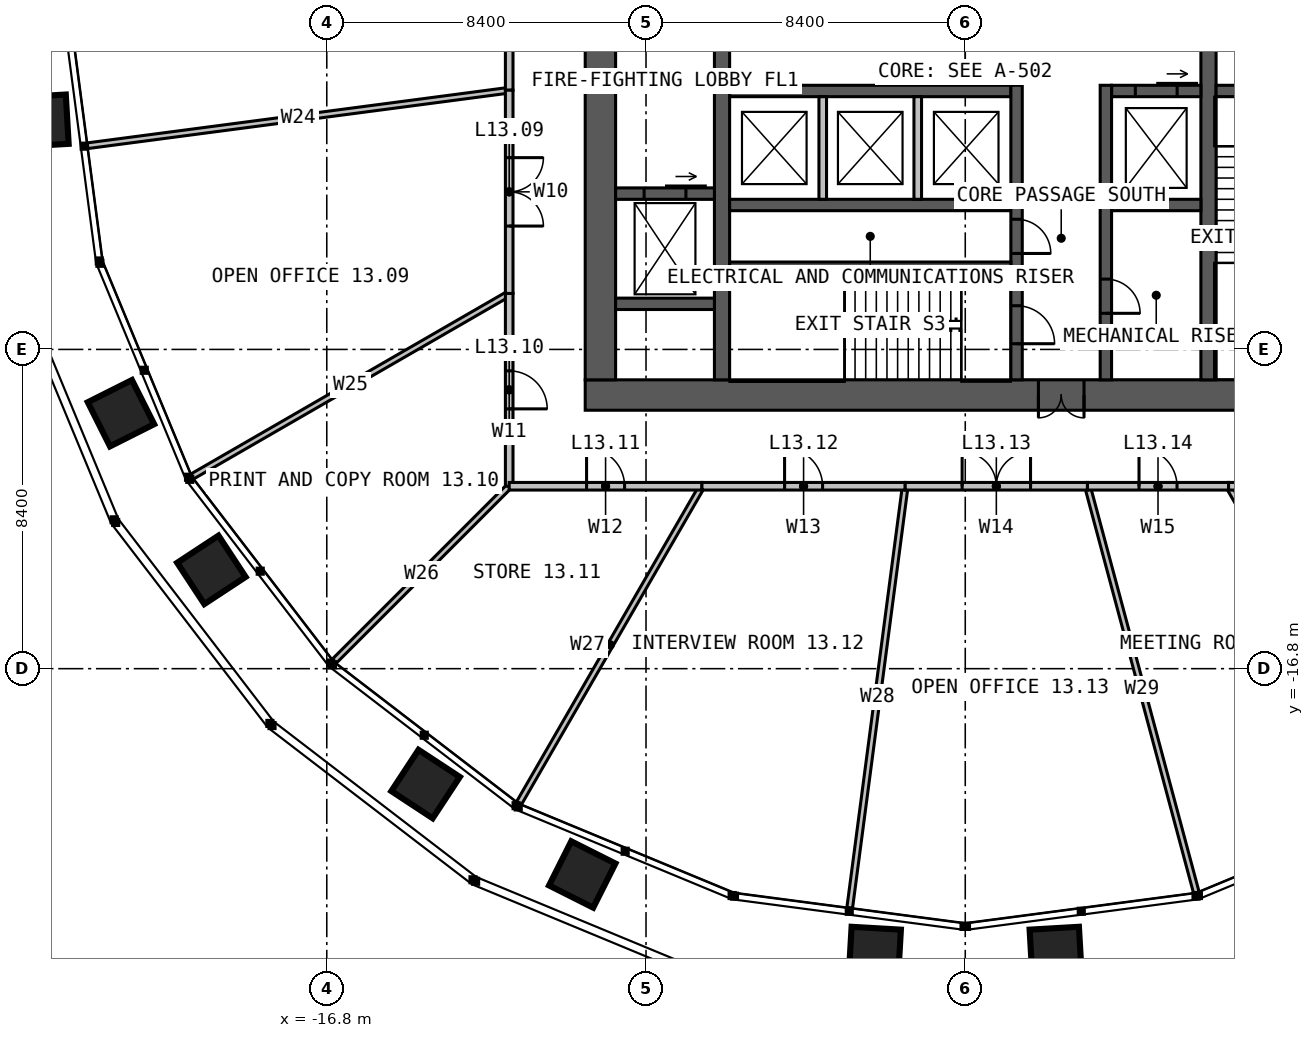
"""IFC4 building model, lengths in metres.
Left out: names, types, materials, properties, quantities, classifications, styles, units other than length and angle.
Written with IfcOpenShell. Run it as: python <this file> out.ifc"""

import sys

from ifc_helpers import new_model, si_unit, direction, frame, frame_2d, origin, place, context, subcontext, project, spatial, rectangle, extrude, element, fill, save


model = new_model("IFC4")
c1 = context("Model", 3, precision=1e-05, world=origin(), true_north=direction((0.0, 1.0)))
c2 = subcontext(c1, "Body", "Model", "MODEL_VIEW")
j1 = project(units=[si_unit("LENGTHUNIT", "METRE"), si_unit("PLANEANGLEUNIT", "RADIAN")], contexts=[c1])
p1 = place(None, origin())
s1 = spatial("IfcSite", under=j1, at=p1, CompositionType="ELEMENT")
p2 = place(p1, origin())
s2 = spatial("IfcBuilding", under=s1, at=p2, CompositionType="ELEMENT")
p3 = place(p2, frame((0.0, 0.0, 57.0)))
s3 = spatial("IfcBuildingStorey", under=s2, at=p3, CompositionType="ELEMENT", Elevation=57.0)
p4 = place(p3, frame((10.0, -9.6, 0.0), z_axis=(0.0, 0.0, 1.0), x_axis=(-1.0, 0.0, 0.0)))
e1 = element("IfcWall", 1, at=p4, inside=s3, PredefinedType="SOLIDWALL", context=c2, shape_type="SweptSolid", body=[
    extrude(rectangle(XDim=20.0, YDim=0.8, at=frame_2d((10.0, 0.0))), origin(), (0.0, 0.0, 1.0), 4.0),
])
p5 = place(p4, frame((6.875, 0.0, 0.0)))
e2 = element("IfcOpeningElement", 2, at=p5, cuts=e1, PredefinedType="OPENING", context=c2, shape_type="SweptSolid", body=[
    extrude(rectangle(XDim=1.2, YDim=2.2, at=frame_2d((0.6, 1.1))), frame((0.0, 0.41, 0.0), z_axis=(0.0, -1.0, 0.0), x_axis=(1.0, 0.0, 0.0)), (0.0, 0.0, 1.0), 0.82),
])
p6 = place(p3, frame((-9.6, 9.2, 0.0), z_axis=(0.0, 0.0, 1.0), x_axis=(0.0, -1.0, 0.0)))
e3 = element("IfcWall", 3, at=p6, inside=s3, PredefinedType="SOLIDWALL", context=c2, shape_type="SweptSolid", body=[
    extrude(rectangle(XDim=18.4, YDim=0.8, at=frame_2d((9.2, 0.0))), origin(), (0.0, 0.0, 1.0), 4.0),
])
p7 = place(p3, frame((-6.4, -9.2, 0.0), z_axis=(0.0, 0.0, 1.0), x_axis=(0.0, 1.0, 0.0)))
e4 = element("IfcWall", 4, at=p7, inside=s3, PredefinedType="SOLIDWALL", context=c2, shape_type="SweptSolid", body=[
    extrude(rectangle(XDim=18.4, YDim=0.4, at=frame_2d((9.2, 0.0))), origin(), (0.0, 0.0, 1.0), 4.0),
])
p8 = place(p7, frame((8.7, 0.0, 0.0)))
e5 = element("IfcOpeningElement", 5, at=p8, cuts=e4, PredefinedType="OPENING", context=c2, shape_type="SweptSolid", body=[
    extrude(rectangle(XDim=1.0, YDim=2.2, at=frame_2d((0.5, 1.1))), frame((0.0, 0.21, 0.0), z_axis=(0.0, -1.0, 0.0), x_axis=(1.0, 0.0, 0.0)), (0.0, 0.0, 1.0), 0.42),
])
p9 = place(p3, frame((6.4, 9.2, 0.0), z_axis=(0.0, 0.0, 1.0), x_axis=(0.0, -1.0, 0.0)))
e6 = element("IfcWall", 6, at=p9, inside=s3, PredefinedType="SOLIDWALL", context=c2, shape_type="SweptSolid", body=[
    extrude(rectangle(XDim=18.4, YDim=0.4, at=frame_2d((9.2, 0.0))), origin(), (0.0, 0.0, 1.0), 4.0),
])
p10 = place(p9, frame((8.7, 0.0, 0.0)))
e7 = element("IfcOpeningElement", 7, at=p10, cuts=e6, PredefinedType="OPENING", context=c2, shape_type="SweptSolid", body=[
    extrude(rectangle(XDim=1.0, YDim=2.2, at=frame_2d((0.5, 1.1))), frame((0.0, 0.21, 0.0), z_axis=(0.0, -1.0, 0.0), x_axis=(1.0, 0.0, 0.0)), (0.0, 0.0, 1.0), 0.42),
])
p11 = place(p3, frame((-6.2, -1.6, 0.0), z_axis=(0.0, 0.0, 1.0), x_axis=(1.0, 0.0, 0.0)))
e8 = element("IfcWall", 8, at=p11, inside=s3, PredefinedType="SOLIDWALL", context=c2, shape_type="SweptSolid", body=[
    extrude(rectangle(XDim=7.4, YDim=0.3, at=frame_2d((3.7, 0.0))), origin(), (0.0, 0.0, 1.0), 4.0),
])
p12 = place(p3, frame((3.85, -1.6, 0.0), z_axis=(0.0, 0.0, 1.0), x_axis=(1.0, 0.0, 0.0)))
e9 = element("IfcWall", 9, at=p12, inside=s3, PredefinedType="SOLIDWALL", context=c2, shape_type="SweptSolid", body=[
    extrude(rectangle(XDim=2.35, YDim=0.3, at=frame_2d((1.175, 0.0))), origin(), (0.0, 0.0, 1.0), 4.0),
])
p13 = place(p12, frame((0.625, 0.0, 0.0)))
e10 = element("IfcOpeningElement", 10, at=p13, cuts=e9, PredefinedType="OPENING", context=c2, shape_type="SweptSolid", body=[
    extrude(rectangle(XDim=1.1, YDim=2.2, at=frame_2d((0.55, 1.1))), frame((0.0, 0.16, 0.0), z_axis=(0.0, -1.0, 0.0), x_axis=(1.0, 0.0, 0.0)), (0.0, 0.0, 1.0), 0.32),
])
p14 = place(p3, frame((-6.2, -4.6, 0.0), z_axis=(0.0, 0.0, 1.0), x_axis=(1.0, 0.0, 0.0)))
e11 = element("IfcWall", 11, at=p14, inside=s3, PredefinedType="SOLIDWALL", context=c2, shape_type="SweptSolid", body=[
    extrude(rectangle(XDim=7.4, YDim=0.3, at=frame_2d((3.7, 0.0))), origin(), (0.0, 0.0, 1.0), 4.0),
])
p15 = place(p3, frame((3.85, -4.6, 0.0), z_axis=(0.0, 0.0, 1.0), x_axis=(1.0, 0.0, 0.0)))
e12 = element("IfcWall", 12, at=p15, inside=s3, PredefinedType="SOLIDWALL", context=c2, shape_type="SweptSolid", body=[
    extrude(rectangle(XDim=2.35, YDim=0.3, at=frame_2d((1.175, 0.0))), origin(), (0.0, 0.0, 1.0), 4.0),
])
p16 = place(p3, frame((1.35, -1.45, 0.0), z_axis=(0.0, 0.0, 1.0), x_axis=(0.0, -1.0, 0.0)))
e13 = element("IfcWall", 13, at=p16, inside=s3, PredefinedType="SOLIDWALL", context=c2, shape_type="SweptSolid", body=[
    extrude(rectangle(XDim=7.75, YDim=0.3, at=frame_2d((3.875, 0.0))), origin(), (0.0, 0.0, 1.0), 4.0),
])
p17 = place(p16, frame((5.8, 0.0, 0.0)))
e14 = element("IfcOpeningElement", 14, at=p17, cuts=e13, PredefinedType="OPENING", context=c2, shape_type="SweptSolid", body=[
    extrude(rectangle(XDim=1.0, YDim=2.2, at=frame_2d((0.5, 1.1))), frame((0.0, 0.16, 0.0), z_axis=(0.0, -1.0, 0.0), x_axis=(1.0, 0.0, 0.0)), (0.0, 0.0, 1.0), 0.32),
])
p18 = place(p16, frame((3.525, 0.0, 0.0)))
e15 = element("IfcOpeningElement", 15, at=p18, cuts=e13, PredefinedType="OPENING", context=c2, shape_type="SweptSolid", body=[
    extrude(rectangle(XDim=0.9, YDim=2.2, at=frame_2d((0.45, 1.1))), frame((0.0, 0.16, 0.0), z_axis=(0.0, -1.0, 0.0), x_axis=(1.0, 0.0, 0.0)), (0.0, 0.0, 1.0), 0.32),
])
p19 = place(p3, frame((3.7, -1.45, 0.0), z_axis=(0.0, 0.0, 1.0), x_axis=(0.0, -1.0, 0.0)))
e16 = element("IfcWall", 16, at=p19, inside=s3, PredefinedType="SOLIDWALL", context=c2, shape_type="SweptSolid", body=[
    extrude(rectangle(XDim=7.75, YDim=0.3, at=frame_2d((3.875, 0.0))), origin(), (0.0, 0.0, 1.0), 4.0),
])
p20 = place(p19, frame((5.1, 0.0, 0.0)))
e17 = element("IfcOpeningElement", 17, at=p20, cuts=e16, PredefinedType="OPENING", context=c2, shape_type="SweptSolid", body=[
    extrude(rectangle(XDim=0.9, YDim=2.2, at=frame_2d((0.45, 1.1))), frame((0.0, 0.16, 0.0), z_axis=(0.0, -1.0, 0.0), x_axis=(1.0, 0.0, 0.0)), (0.0, 0.0, 1.0), 0.32),
])
p21 = place(p3, frame((-6.2, -6.2, 0.0), z_axis=(0.0, 0.0, 1.0), x_axis=(1.0, 0.0, 0.0)))
e18 = element("IfcWall", 18, at=p21, inside=s3, PredefinedType="SOLIDWALL", context=c2, shape_type="SweptSolid", body=[
    extrude(rectangle(XDim=7.4, YDim=0.2, at=frame_2d((3.7, 0.0))), origin(), (0.0, 0.0, 1.0), 4.0),
])
p22 = place(p3, frame((6.6, -1.6, 0.0), z_axis=(0.0, 0.0, 1.0), x_axis=(1.0, 0.0, 0.0)))
e19 = element("IfcWall", 19, at=p22, inside=s3, PredefinedType="SOLIDWALL", context=c2, shape_type="SweptSolid", body=[
    extrude(rectangle(XDim=2.6, YDim=0.3, at=frame_2d((1.3, 0.0))), origin(), (0.0, 0.0, 1.0), 4.0),
])
p23 = place(p22, frame((0.8, 0.0, 0.0)))
e20 = element("IfcOpeningElement", 20, at=p23, cuts=e19, PredefinedType="OPENING", context=c2, shape_type="SweptSolid", body=[
    extrude(rectangle(XDim=1.0, YDim=2.2, at=frame_2d((0.5, 1.1))), frame((0.0, 0.16, 0.0), z_axis=(0.0, -1.0, 0.0), x_axis=(1.0, 0.0, 0.0)), (0.0, 0.0, 1.0), 0.32),
])
p24 = place(p3, frame((-9.2, -4.3, 0.0), z_axis=(0.0, 0.0, 1.0), x_axis=(1.0, 0.0, 0.0)))
e21 = element("IfcWall", 21, at=p24, inside=s3, PredefinedType="SOLIDWALL", context=c2, shape_type="SweptSolid", body=[
    extrude(rectangle(XDim=2.6, YDim=0.3, at=frame_2d((1.3, 0.0))), origin(), (0.0, 0.0, 1.0), 4.0),
])
p25 = place(p24, frame((0.75, 0.0, 0.0)))
e22 = element("IfcOpeningElement", 22, at=p25, cuts=e21, PredefinedType="OPENING", context=c2, shape_type="SweptSolid", body=[
    extrude(rectangle(XDim=1.1, YDim=2.2, at=frame_2d((0.55, 1.1))), frame((0.0, 0.16, 0.0), z_axis=(0.0, -1.0, 0.0), x_axis=(1.0, 0.0, 0.0)), (0.0, 0.0, 1.0), 0.32),
])
p26 = place(p3, frame((-9.2, -7.2, 0.0), z_axis=(0.0, 0.0, 1.0), x_axis=(1.0, 0.0, 0.0)))
e23 = element("IfcWall", 23, at=p26, inside=s3, PredefinedType="SOLIDWALL", context=c2, shape_type="SweptSolid", body=[
    extrude(rectangle(XDim=2.6, YDim=0.3, at=frame_2d((1.3, 0.0))), origin(), (0.0, 0.0, 1.0), 4.0),
])
for number, where, z_axis, x_axis in (
    (24, (-3.75, -1.75, 0.0), (0.0, 0.0, 1.0), (0.0, -1.0, 0.0)),
    (25, (-1.25, -1.75, 0.0), (0.0, 0.0, 1.0), (0.0, -1.0, 0.0)),
):
    element("IfcWall", number, at=place(p3, frame(where, z_axis=z_axis, x_axis=x_axis)), inside=s3, PredefinedType="SOLIDWALL", context=c2, shape_type="SweptSolid", body=[
        extrude(rectangle(XDim=2.7, YDim=0.2, at=frame_2d((1.35, 0.0))), origin(), (0.0, 0.0, 1.0), 3.75),
    ])
p27 = place(p3, frame((-12.0, -1.58, 0.0), z_axis=(0.0, 0.0, 1.0), x_axis=(-0.991446050429, -0.130517160134, 0.0)))
e26 = element("IfcWall", 26, at=p27, inside=s3, PredefinedType="PARTITIONING", context=c2, shape_type="SweptSolid", body=[
    extrude(rectangle(XDim=11.19, YDim=0.15, at=frame_2d((5.595, 0.0))), origin(), (0.0, 0.0, 1.0), 2.79),
])
p28 = place(p3, frame((-12.0, -6.928, 0.0), z_axis=(0.0, 0.0, 1.0), x_axis=(-0.866030350715, -0.499991431567, 0.0)))
e27 = element("IfcWall", 27, at=p28, inside=s3, PredefinedType="PARTITIONING", context=c2, shape_type="SweptSolid", body=[
    extrude(rectangle(XDim=9.638, YDim=0.15, at=frame_2d((4.819, 0.0))), origin(), (0.0, 0.0, 1.0), 2.79),
])
p29 = place(p3, frame((-12.0, -12.0, 0.0), z_axis=(0.0, 0.0, 1.0), x_axis=(-0.707106781187, -0.707106781187, 0.0)))
e28 = element("IfcWall", 28, at=p29, inside=s3, PredefinedType="PARTITIONING", context=c2, shape_type="SweptSolid", body=[
    extrude(rectangle(XDim=6.524, YDim=0.15, at=frame_2d((3.262, 0.0))), origin(), (0.0, 0.0, 1.0), 2.79),
])
p30 = place(p3, frame((-6.928, -12.0, 0.0), z_axis=(0.0, 0.0, 1.0), x_axis=(-0.499991431567, -0.866030350715, 0.0)))
e29 = element("IfcWall", 29, at=p30, inside=s3, PredefinedType="PARTITIONING", context=c2, shape_type="SweptSolid", body=[
    extrude(rectangle(XDim=9.638, YDim=0.15, at=frame_2d((4.819, 0.0))), origin(), (0.0, 0.0, 1.0), 2.79),
])
p31 = place(p3, frame((-1.58, -12.0, 0.0), z_axis=(0.0, 0.0, 1.0), x_axis=(-0.130517160134, -0.991446050429, 0.0)))
e30 = element("IfcWall", 30, at=p31, inside=s3, PredefinedType="PARTITIONING", context=c2, shape_type="SweptSolid", body=[
    extrude(rectangle(XDim=11.19, YDim=0.15, at=frame_2d((5.595, 0.0))), origin(), (0.0, 0.0, 1.0), 2.79),
])
p32 = place(p3, frame((3.215, -12.0, 0.0), z_axis=(0.0, 0.0, 1.0), x_axis=(0.258830514209, -0.965922753078, 0.0)))
e31 = element("IfcWall", 31, at=p32, inside=s3, PredefinedType="PARTITIONING", context=c2, shape_type="SweptSolid", body=[
    extrude(rectangle(XDim=11.071, YDim=0.15, at=frame_2d((5.535, 0.0))), origin(), (0.0, 0.0, 1.0), 2.79),
])
p33 = place(p3, frame((6.928, -12.0, 0.0), z_axis=(0.0, 0.0, 1.0), x_axis=(0.499991431567, -0.866030350715, 0.0)))
e32 = element("IfcWall", 32, at=p33, inside=s3, PredefinedType="PARTITIONING", context=c2, shape_type="SweptSolid", body=[
    extrude(rectangle(XDim=9.638, YDim=0.15, at=frame_2d((4.819, 0.0))), origin(), (0.0, 0.0, 1.0), 2.79),
])
p34 = place(p3, frame((-12.0, 6.928, 0.0), z_axis=(0.0, 0.0, 1.0), x_axis=(0.0, -1.0, 0.0)))
e33 = element("IfcWall", 33, at=p34, inside=s3, PredefinedType="PARTITIONING", context=c2, shape_type="SweptSolid", body=[
    extrude(rectangle(XDim=8.508, YDim=0.2, at=frame_2d((4.254, 0.0))), origin(), (0.0, 0.0, 1.0), 3.8),
])
p35 = place(p34, frame((3.754, 0.0, 0.0)))
e34 = element("IfcOpeningElement", 34, at=p35, cuts=e33, PredefinedType="OPENING", context=c2, shape_type="SweptSolid", body=[
    extrude(rectangle(XDim=1.0, YDim=2.2, at=frame_2d((0.5, 1.1))), frame((0.0, 0.11, 0.0), z_axis=(0.0, -1.0, 0.0), x_axis=(1.0, 0.0, 0.0)), (0.0, 0.0, 1.0), 0.22),
])
p36 = place(p3, frame((-12.0, -1.58, 0.0), z_axis=(0.0, 0.0, 1.0), x_axis=(0.0, -1.0, 0.0)))
e35 = element("IfcWall", 35, at=p36, inside=s3, PredefinedType="PARTITIONING", context=c2, shape_type="SweptSolid", body=[
    extrude(rectangle(XDim=5.348, YDim=0.2, at=frame_2d((2.674, 0.0))), origin(), (0.0, 0.0, 1.0), 3.8),
])
p37 = place(p36, frame((1.774, 0.0, 0.0)))
e36 = element("IfcOpeningElement", 36, at=p37, cuts=e35, PredefinedType="OPENING", context=c2, shape_type="SweptSolid", body=[
    extrude(rectangle(XDim=1.8, YDim=2.2, at=frame_2d((0.9, 1.1))), frame((0.0, 0.11, 0.0), z_axis=(0.0, -1.0, 0.0), x_axis=(1.0, 0.0, 0.0)), (0.0, 0.0, 1.0), 0.22),
])
p38 = place(p3, frame((-12.0, -6.928, 0.0), z_axis=(0.0, 0.0, 1.0), x_axis=(0.0, -1.0, 0.0)))
e37 = element("IfcWall", 37, at=p38, inside=s3, PredefinedType="PARTITIONING", context=c2, shape_type="SweptSolid", body=[
    extrude(rectangle(XDim=5.072, YDim=0.2, at=frame_2d((2.536, 0.0))), origin(), (0.0, 0.0, 1.0), 3.8),
])
p39 = place(p38, frame((2.036, 0.0, 0.0)))
e38 = element("IfcOpeningElement", 38, at=p39, cuts=e37, PredefinedType="OPENING", context=c2, shape_type="SweptSolid", body=[
    extrude(rectangle(XDim=1.0, YDim=2.2, at=frame_2d((0.5, 1.1))), frame((0.0, 0.11, 0.0), z_axis=(0.0, -1.0, 0.0), x_axis=(1.0, 0.0, 0.0)), (0.0, 0.0, 1.0), 0.22),
])
p40 = place(p3, frame((-12.0, -12.0, 0.0), z_axis=(0.0, 0.0, 1.0), x_axis=(1.0, 0.0, 0.0)))
e39 = element("IfcWall", 39, at=p40, inside=s3, PredefinedType="PARTITIONING", context=c2, shape_type="SweptSolid", body=[
    extrude(rectangle(XDim=5.072, YDim=0.2, at=frame_2d((2.536, 0.0))), origin(), (0.0, 0.0, 1.0), 3.8),
])
p41 = place(p40, frame((2.036, 0.0, 0.0)))
e40 = element("IfcOpeningElement", 40, at=p41, cuts=e39, PredefinedType="OPENING", context=c2, shape_type="SweptSolid", body=[
    extrude(rectangle(XDim=1.0, YDim=2.2, at=frame_2d((0.5, 1.1))), frame((0.0, 0.11, 0.0), z_axis=(0.0, -1.0, 0.0), x_axis=(1.0, 0.0, 0.0)), (0.0, 0.0, 1.0), 0.22),
])
p42 = place(p3, frame((-6.928, -12.0, 0.0), z_axis=(0.0, 0.0, 1.0), x_axis=(1.0, 0.0, 0.0)))
e41 = element("IfcWall", 41, at=p42, inside=s3, PredefinedType="PARTITIONING", context=c2, shape_type="SweptSolid", body=[
    extrude(rectangle(XDim=5.348, YDim=0.2, at=frame_2d((2.674, 0.0))), origin(), (0.0, 0.0, 1.0), 3.8),
])
p43 = place(p42, frame((2.174, 0.0, 0.0)))
e42 = element("IfcOpeningElement", 42, at=p43, cuts=e41, PredefinedType="OPENING", context=c2, shape_type="SweptSolid", body=[
    extrude(rectangle(XDim=1.0, YDim=2.2, at=frame_2d((0.5, 1.1))), frame((0.0, 0.11, 0.0), z_axis=(0.0, -1.0, 0.0), x_axis=(1.0, 0.0, 0.0)), (0.0, 0.0, 1.0), 0.22),
])
p44 = place(p3, frame((-1.58, -12.0, 0.0), z_axis=(0.0, 0.0, 1.0), x_axis=(1.0, 0.0, 0.0)))
e43 = element("IfcWall", 43, at=p44, inside=s3, PredefinedType="PARTITIONING", context=c2, shape_type="SweptSolid", body=[
    extrude(rectangle(XDim=4.795, YDim=0.2, at=frame_2d((2.397, 0.0))), origin(), (0.0, 0.0, 1.0), 3.8),
])
p45 = place(p44, frame((1.498, 0.0, 0.0)))
e44 = element("IfcOpeningElement", 44, at=p45, cuts=e43, PredefinedType="OPENING", context=c2, shape_type="SweptSolid", body=[
    extrude(rectangle(XDim=1.8, YDim=2.2, at=frame_2d((0.9, 1.1))), frame((0.0, 0.11, 0.0), z_axis=(0.0, -1.0, 0.0), x_axis=(1.0, 0.0, 0.0)), (0.0, 0.0, 1.0), 0.22),
])
p46 = place(p3, frame((3.215, -12.0, 0.0), z_axis=(0.0, 0.0, 1.0), x_axis=(1.0, 0.0, 0.0)))
e45 = element("IfcWall", 45, at=p46, inside=s3, PredefinedType="PARTITIONING", context=c2, shape_type="SweptSolid", body=[
    extrude(rectangle(XDim=3.713, YDim=0.2, at=frame_2d((1.856, 0.0))), origin(), (0.0, 0.0, 1.0), 3.8),
])
p47 = place(p46, frame((1.356, 0.0, 0.0)))
e46 = element("IfcOpeningElement", 46, at=p47, cuts=e45, PredefinedType="OPENING", context=c2, shape_type="SweptSolid", body=[
    extrude(rectangle(XDim=1.0, YDim=2.2, at=frame_2d((0.5, 1.1))), frame((0.0, 0.11, 0.0), z_axis=(0.0, -1.0, 0.0), x_axis=(1.0, 0.0, 0.0)), (0.0, 0.0, 1.0), 0.22),
])
p48 = place(p3, frame((6.928, -12.0, 0.0), z_axis=(0.0, 0.0, 1.0), x_axis=(1.0, 0.0, 0.0)))
e47 = element("IfcWall", 47, at=p48, inside=s3, PredefinedType="PARTITIONING", context=c2, shape_type="SweptSolid", body=[
    extrude(rectangle(XDim=3.072, YDim=0.2, at=frame_2d((1.536, 0.0))), origin(), (0.0, 0.0, 1.0), 3.8),
])
p49 = place(p5, origin())
e48 = element("IfcDoor", 48, at=p49, inside=s3, OperationType="DOUBLE_DOOR_SINGLE_SWING", PredefinedType="DOOR", context=c2, shape_type="SweptSolid", body=[
    extrude(rectangle(XDim=1.2, YDim=2.2, at=frame_2d((0.6, 1.1))), frame((0.0, 0.025, 0.0), z_axis=(0.0, -1.0, 0.0), x_axis=(1.0, 0.0, 0.0)), (0.0, 0.0, 1.0), 0.05),
])
fill(e2, e48)
p50 = place(p17, origin())
e49 = element("IfcDoor", 49, at=p50, inside=s3, OperationType="SINGLE_SWING_RIGHT", PredefinedType="DOOR", context=c2, shape_type="SweptSolid", body=[
    extrude(rectangle(XDim=1.0, YDim=2.2, at=frame_2d((0.5, 1.1))), frame((0.0, 0.025, 0.0), z_axis=(0.0, -1.0, 0.0), x_axis=(1.0, 0.0, 0.0)), (0.0, 0.0, 1.0), 0.05),
])
fill(e14, e49)
p51 = place(p18, origin())
e50 = element("IfcDoor", 50, at=p51, inside=s3, OperationType="SINGLE_SWING_RIGHT", PredefinedType="DOOR", context=c2, shape_type="SweptSolid", body=[
    extrude(rectangle(XDim=0.9, YDim=2.2, at=frame_2d((0.45, 1.1))), frame((0.0, 0.025, 0.0), z_axis=(0.0, -1.0, 0.0), x_axis=(1.0, 0.0, 0.0)), (0.0, 0.0, 1.0), 0.05),
])
fill(e15, e50)
p52 = place(p20, origin())
e51 = element("IfcDoor", 51, at=p52, inside=s3, OperationType="SINGLE_SWING_RIGHT", PredefinedType="DOOR", context=c2, shape_type="SweptSolid", body=[
    extrude(rectangle(XDim=0.9, YDim=2.2, at=frame_2d((0.45, 1.1))), frame((0.0, 0.025, 0.0), z_axis=(0.0, -1.0, 0.0), x_axis=(1.0, 0.0, 0.0)), (0.0, 0.0, 1.0), 0.05),
])
fill(e17, e51)
p53 = place(p13, origin())
e52 = element("IfcDoor", 52, at=p53, inside=s3, OperationType="SLIDING_TO_LEFT", PredefinedType="DOOR", context=c2, shape_type="SweptSolid", body=[
    extrude(rectangle(XDim=1.1, YDim=2.2, at=frame_2d((0.55, 1.1))), frame((0.0, 0.025, 0.0), z_axis=(0.0, -1.0, 0.0), x_axis=(1.0, 0.0, 0.0)), (0.0, 0.0, 1.0), 0.05),
])
fill(e10, e52)
p54 = place(p25, origin())
e53 = element("IfcDoor", 53, at=p54, inside=s3, OperationType="SLIDING_TO_LEFT", PredefinedType="DOOR", context=c2, shape_type="SweptSolid", body=[
    extrude(rectangle(XDim=1.1, YDim=2.2, at=frame_2d((0.55, 1.1))), frame((0.0, 0.025, 0.0), z_axis=(0.0, -1.0, 0.0), x_axis=(1.0, 0.0, 0.0)), (0.0, 0.0, 1.0), 0.05),
])
fill(e22, e53)
p55 = place(p37, origin())
e54 = element("IfcDoor", 54, at=p55, inside=s3, OperationType="DOUBLE_DOOR_SINGLE_SWING", PredefinedType="DOOR", context=c2, shape_type="SweptSolid", body=[
    extrude(rectangle(XDim=1.8, YDim=2.2, at=frame_2d((0.9, 1.1))), frame((0.0, 0.025, 0.0), z_axis=(0.0, -1.0, 0.0), x_axis=(1.0, 0.0, 0.0)), (0.0, 0.0, 1.0), 0.05),
])
fill(e36, e54)
p56 = place(p39, origin())
e55 = element("IfcDoor", 55, at=p56, inside=s3, OperationType="SINGLE_SWING_RIGHT", PredefinedType="DOOR", context=c2, shape_type="SweptSolid", body=[
    extrude(rectangle(XDim=1.0, YDim=2.2, at=frame_2d((0.5, 1.1))), frame((0.0, 0.025, 0.0), z_axis=(0.0, -1.0, 0.0), x_axis=(1.0, 0.0, 0.0)), (0.0, 0.0, 1.0), 0.05),
])
fill(e38, e55)
p57 = place(p41, origin())
e56 = element("IfcDoor", 56, at=p57, inside=s3, OperationType="SINGLE_SWING_LEFT", PredefinedType="DOOR", context=c2, shape_type="SweptSolid", body=[
    extrude(rectangle(XDim=1.0, YDim=2.2, at=frame_2d((0.5, 1.1))), frame((0.0, 0.025, 0.0), z_axis=(0.0, -1.0, 0.0), x_axis=(1.0, 0.0, 0.0)), (0.0, 0.0, 1.0), 0.05),
])
fill(e40, e56)
p58 = place(p43, origin())
e57 = element("IfcDoor", 57, at=p58, inside=s3, OperationType="SINGLE_SWING_LEFT", PredefinedType="DOOR", context=c2, shape_type="SweptSolid", body=[
    extrude(rectangle(XDim=1.0, YDim=2.2, at=frame_2d((0.5, 1.1))), frame((0.0, 0.025, 0.0), z_axis=(0.0, -1.0, 0.0), x_axis=(1.0, 0.0, 0.0)), (0.0, 0.0, 1.0), 0.05),
])
fill(e42, e57)
p59 = place(p45, origin())
e58 = element("IfcDoor", 58, at=p59, inside=s3, OperationType="DOUBLE_DOOR_SINGLE_SWING", PredefinedType="DOOR", context=c2, shape_type="SweptSolid", body=[
    extrude(rectangle(XDim=1.8, YDim=2.2, at=frame_2d((0.9, 1.1))), frame((0.0, 0.025, 0.0), z_axis=(0.0, -1.0, 0.0), x_axis=(1.0, 0.0, 0.0)), (0.0, 0.0, 1.0), 0.05),
])
fill(e44, e58)
p60 = place(p47, origin())
e59 = element("IfcDoor", 59, at=p60, inside=s3, OperationType="SINGLE_SWING_LEFT", PredefinedType="DOOR", context=c2, shape_type="SweptSolid", body=[
    extrude(rectangle(XDim=1.0, YDim=2.2, at=frame_2d((0.5, 1.1))), frame((0.0, 0.025, 0.0), z_axis=(0.0, -1.0, 0.0), x_axis=(1.0, 0.0, 0.0)), (0.0, 0.0, 1.0), 0.05),
])
fill(e46, e59)
save(model, sys.argv[1])
